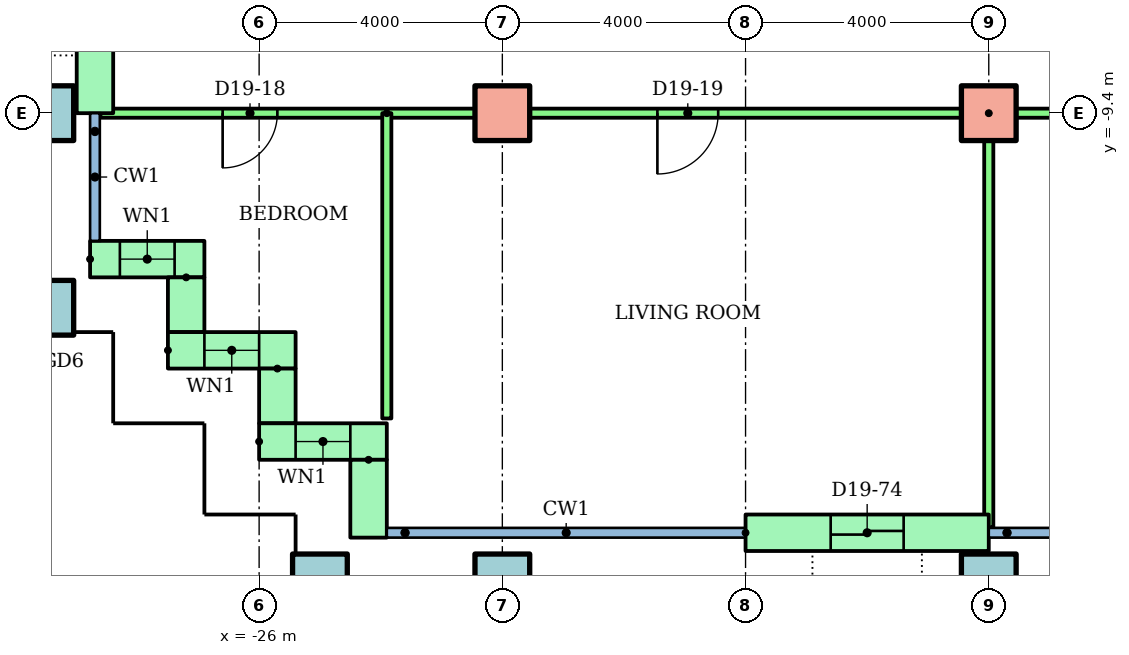
"""IFC4 building model, lengths in metres.
Left out: names, types, materials, properties, quantities, classifications, styles, units other than length and angle.
Written with IfcOpenShell. Run it as: python <this file> out.ifc"""

import sys

from ifc_helpers import new_model, si_unit, direction, frame, frame_2d, origin, origin_2d, place, context, subcontext, project, spatial, rectangle, hollow_rectangle, extrude, element, fill, save


model = new_model("IFC4")
c1 = context("Model", 3, precision=1e-05, world=origin(), true_north=direction((0.0, 1.0)))
c2 = subcontext(c1, "Body", "Model", "MODEL_VIEW")
j1 = project(units=[si_unit("LENGTHUNIT", "METRE"), si_unit("PLANEANGLEUNIT", "RADIAN")], contexts=[c1])
p1 = place(None, origin())
s1 = spatial("IfcSite", under=j1, at=p1, CompositionType="ELEMENT")
p2 = place(p1, origin())
s2 = spatial("IfcBuilding", under=s1, at=p2, CompositionType="ELEMENT")
p3 = place(p2, frame((0.0, 0.0, 77.5)))
s3 = spatial("IfcBuildingStorey", under=s2, at=p3, CompositionType="ELEMENT", Elevation=77.5)
for number, where in (
    (1, (-25.0, -17.1, 0.0)),
    (2, (-22.0, -17.1, 0.0)),
    (3, (-14.0, -17.1, 0.0)),
    (4, (-29.5, -12.6, 0.0)),
    (5, (-29.5, -9.4, 0.0)),
):
    element("IfcColumn", number, at=place(p3, frame(where)), inside=s3, PredefinedType="COLUMN", context=c2, shape_type="SweptSolid", body=[
        extrude(hollow_rectangle(XDim=0.9, YDim=0.9, WallThickness=0.045, at=origin_2d()), origin(), (0.0, 0.0, 1.0), 3.2),
    ])
for number, where in (
    (6, (-22.0, -9.4, 0.0)),
    (7, (-14.0, -9.4, 0.0)),
):
    element("IfcColumn", number, at=place(p3, frame(where)), inside=s3, PredefinedType="COLUMN", context=c2, shape_type="SweptSolid", body=[
        extrude(rectangle(XDim=0.9, YDim=0.9, at=origin_2d()), origin(), (0.0, 0.0, 1.0), 3.2),
    ])
p4 = place(p3, frame((-28.7, -5.7, 0.0), z_axis=(0.0, 0.0, 1.0), x_axis=(0.0, -1.0, 0.0)))
e8 = element("IfcWall", 8, at=p4, inside=s3, PredefinedType="STANDARD", context=c2, shape_type="SweptSolid", body=[
    extrude(rectangle(XDim=3.7, YDim=0.6, at=frame_2d((1.85, 0.0))), origin(), (0.0, 0.0, 1.0), 2.92),
])
p5 = place(p4, frame((0.825, 0.0, 0.0)))
e9 = element("IfcOpeningElement", 9, at=p5, cuts=e8, PredefinedType="OPENING", context=c2, shape_type="SweptSolid", body=[
    extrude(rectangle(XDim=1.2, YDim=2.1, at=frame_2d((0.6, 1.05))), frame((0.0, 0.31, 0.0), z_axis=(0.0, -1.0, 0.0), x_axis=(1.0, 0.0, 0.0)), (0.0, 0.0, 1.0), 0.62),
])
p6 = place(p3, frame((-28.78, -11.8, 0.0)))
e10 = element("IfcWall", 10, at=p6, inside=s3, PredefinedType="STANDARD", context=c2, shape_type="SweptSolid", body=[
    extrude(rectangle(XDim=1.88, YDim=0.6, at=frame_2d((0.94, 0.0))), origin(), (0.0, 0.0, 1.0), 2.92),
])
p7 = place(p6, frame((0.49, 0.0, 0.9)))
e11 = element("IfcOpeningElement", 11, at=p7, cuts=e10, PredefinedType="OPENING", context=c2, shape_type="SweptSolid", body=[
    extrude(rectangle(XDim=0.9, YDim=1.5, at=frame_2d((0.45, 0.75))), frame((0.0, 0.31, 0.0), z_axis=(0.0, -1.0, 0.0), x_axis=(1.0, 0.0, 0.0)), (0.0, 0.0, 1.0), 0.62),
])
p8 = place(p3, frame((-27.2, -12.1, 0.0), z_axis=(0.0, 0.0, 1.0), x_axis=(0.0, -1.0, 0.0)))
e12 = element("IfcWall", 12, at=p8, inside=s3, PredefinedType="STANDARD", context=c2, shape_type="SweptSolid", body=[
    extrude(rectangle(XDim=0.9, YDim=0.6, at=frame_2d((0.45, 0.0))), origin(), (0.0, 0.0, 1.0), 2.92),
])
p9 = place(p3, frame((-27.5, -13.3, 0.0)))
e13 = element("IfcWall", 13, at=p9, inside=s3, PredefinedType="STANDARD", context=c2, shape_type="SweptSolid", body=[
    extrude(rectangle(XDim=2.1, YDim=0.6, at=frame_2d((1.05, 0.0))), origin(), (0.0, 0.0, 1.0), 2.92),
])
p10 = place(p9, frame((0.6, 0.0, 0.9)))
e14 = element("IfcOpeningElement", 14, at=p10, cuts=e13, PredefinedType="OPENING", context=c2, shape_type="SweptSolid", body=[
    extrude(rectangle(XDim=0.9, YDim=1.5, at=frame_2d((0.45, 0.75))), frame((0.0, 0.31, 0.0), z_axis=(0.0, -1.0, 0.0), x_axis=(1.0, 0.0, 0.0)), (0.0, 0.0, 1.0), 0.62),
])
p11 = place(p3, frame((-25.7, -13.6, 0.0), z_axis=(0.0, 0.0, 1.0), x_axis=(0.0, -1.0, 0.0)))
e15 = element("IfcWall", 15, at=p11, inside=s3, PredefinedType="STANDARD", context=c2, shape_type="SweptSolid", body=[
    extrude(rectangle(XDim=0.9, YDim=0.6, at=frame_2d((0.45, 0.0))), origin(), (0.0, 0.0, 1.0), 2.92),
])
p12 = place(p3, frame((-26.0, -14.8, 0.0)))
e16 = element("IfcWall", 16, at=p12, inside=s3, PredefinedType="STANDARD", context=c2, shape_type="SweptSolid", body=[
    extrude(rectangle(XDim=2.1, YDim=0.6, at=frame_2d((1.05, 0.0))), origin(), (0.0, 0.0, 1.0), 2.92),
])
p13 = place(p12, frame((0.6, 0.0, 0.9)))
e17 = element("IfcOpeningElement", 17, at=p13, cuts=e16, PredefinedType="OPENING", context=c2, shape_type="SweptSolid", body=[
    extrude(rectangle(XDim=0.9, YDim=1.5, at=frame_2d((0.45, 0.75))), frame((0.0, 0.31, 0.0), z_axis=(0.0, -1.0, 0.0), x_axis=(1.0, 0.0, 0.0)), (0.0, 0.0, 1.0), 0.62),
])
p14 = place(p3, frame((-24.2, -15.1, 0.0), z_axis=(0.0, 0.0, 1.0), x_axis=(0.0, -1.0, 0.0)))
e18 = element("IfcWall", 18, at=p14, inside=s3, PredefinedType="STANDARD", context=c2, shape_type="SweptSolid", body=[
    extrude(rectangle(XDim=1.28, YDim=0.6, at=frame_2d((0.64, 0.0))), origin(), (0.0, 0.0, 1.0), 2.92),
])
p15 = place(p3, frame((-18.0, -16.3, 0.0)))
e19 = element("IfcWall", 19, at=p15, inside=s3, PredefinedType="STANDARD", context=c2, shape_type="SweptSolid", body=[
    extrude(rectangle(XDim=4.0, YDim=0.6, at=frame_2d((2.0, 0.0))), origin(), (0.0, 0.0, 1.0), 2.92),
])
p16 = place(p15, frame((1.4, 0.0, 0.0)))
e20 = element("IfcOpeningElement", 20, at=p16, cuts=e19, PredefinedType="OPENING", context=c2, shape_type="SweptSolid", body=[
    extrude(rectangle(XDim=1.2, YDim=2.1, at=frame_2d((0.6, 1.05))), frame((0.0, 0.31, 0.0), z_axis=(0.0, -1.0, 0.0), x_axis=(1.0, 0.0, 0.0)), (0.0, 0.0, 1.0), 0.62),
])
p17 = place(p3, frame((-6.0, -9.4, 0.0), z_axis=(0.0, 0.0, 1.0), x_axis=(-1.0, 0.0, 0.0)))
e21 = element("IfcWall", 21, at=p17, inside=s3, PredefinedType="PARTITIONING", context=c2, shape_type="SweptSolid", body=[
    extrude(rectangle(XDim=22.61, YDim=0.15, at=frame_2d((11.305, 0.0))), origin(), (0.0, 0.0, 1.0), 2.4),
])
p18 = place(p17, frame((19.7, 0.0, 0.0)))
e22 = element("IfcOpeningElement", 22, at=p18, cuts=e21, PredefinedType="OPENING", context=c2, shape_type="SweptSolid", body=[
    extrude(rectangle(XDim=0.9, YDim=2.1, at=frame_2d((0.45, 1.05))), frame((0.0, 0.085, 0.0), z_axis=(0.0, -1.0, 0.0), x_axis=(1.0, 0.0, 0.0)), (0.0, 0.0, 1.0), 0.17),
])
p19 = place(p17, frame((12.45, 0.0, 0.0)))
e23 = element("IfcOpeningElement", 23, at=p19, cuts=e21, PredefinedType="OPENING", context=c2, shape_type="SweptSolid", body=[
    extrude(rectangle(XDim=1.0, YDim=2.1, at=frame_2d((0.5, 1.05))), frame((0.0, 0.085, 0.0), z_axis=(0.0, -1.0, 0.0), x_axis=(1.0, 0.0, 0.0)), (0.0, 0.0, 1.0), 0.17),
])
p20 = place(p17, frame((5.55, 0.0, 0.0)))
e24 = element("IfcOpeningElement", 24, at=p20, cuts=e21, PredefinedType="OPENING", context=c2, shape_type="SweptSolid", body=[
    extrude(rectangle(XDim=0.9, YDim=2.1, at=frame_2d((0.45, 1.05))), frame((0.0, 0.085, 0.0), z_axis=(0.0, -1.0, 0.0), x_axis=(1.0, 0.0, 0.0)), (0.0, 0.0, 1.0), 0.17),
])
p21 = place(p17, frame((1.55, 0.0, 0.0)))
e25 = element("IfcOpeningElement", 25, at=p21, cuts=e21, PredefinedType="OPENING", context=c2, shape_type="SweptSolid", body=[
    extrude(rectangle(XDim=0.9, YDim=2.1, at=frame_2d((0.45, 1.05))), frame((0.0, 0.085, 0.0), z_axis=(0.0, -1.0, 0.0), x_axis=(1.0, 0.0, 0.0)), (0.0, 0.0, 1.0), 0.17),
])
p22 = place(p3, frame((-23.9, -9.4, 0.0), z_axis=(0.0, 0.0, 1.0), x_axis=(0.0, -1.0, 0.0)))
e26 = element("IfcWall", 26, at=p22, inside=s3, PredefinedType="PARTITIONING", context=c2, shape_type="SweptSolid", body=[
    extrude(rectangle(XDim=5.02, YDim=0.15, at=frame_2d((2.51, 0.0))), origin(), (0.0, 0.0, 1.0), 2.4),
])
p23 = place(p3, frame((-14.0, -9.4, 0.0), z_axis=(0.0, 0.0, 1.0), x_axis=(0.0, -1.0, 0.0)))
e27 = element("IfcWall", 27, at=p23, inside=s3, PredefinedType="PARTITIONING", context=c2, shape_type="SweptSolid", body=[
    extrude(rectangle(XDim=6.81, YDim=0.15, at=frame_2d((3.405, 0.0))), origin(), (0.0, 0.0, 1.0), 2.4),
])
p24 = place(p7, origin())
e28 = element("IfcWindow", 28, at=p24, inside=s3, PartitioningType="SINGLE_PANEL", PredefinedType="WINDOW", context=c2, shape_type="SweptSolid", body=[
    extrude(rectangle(XDim=0.9, YDim=1.5, at=frame_2d((0.45, 0.75))), frame((0.0, 0.03, 0.0), z_axis=(0.0, -1.0, 0.0), x_axis=(1.0, 0.0, 0.0)), (0.0, 0.0, 1.0), 0.06),
])
fill(e11, e28)
p25 = place(p10, origin())
e29 = element("IfcWindow", 29, at=p25, inside=s3, PartitioningType="SINGLE_PANEL", PredefinedType="WINDOW", context=c2, shape_type="SweptSolid", body=[
    extrude(rectangle(XDim=0.9, YDim=1.5, at=frame_2d((0.45, 0.75))), frame((0.0, 0.03, 0.0), z_axis=(0.0, -1.0, 0.0), x_axis=(1.0, 0.0, 0.0)), (0.0, 0.0, 1.0), 0.06),
])
fill(e14, e29)
p26 = place(p13, origin())
e30 = element("IfcWindow", 30, at=p26, inside=s3, PartitioningType="SINGLE_PANEL", PredefinedType="WINDOW", context=c2, shape_type="SweptSolid", body=[
    extrude(rectangle(XDim=0.9, YDim=1.5, at=frame_2d((0.45, 0.75))), frame((0.0, 0.03, 0.0), z_axis=(0.0, -1.0, 0.0), x_axis=(1.0, 0.0, 0.0)), (0.0, 0.0, 1.0), 0.06),
])
fill(e17, e30)
p27 = place(p18, origin())
e31 = element("IfcDoor", 31, at=p27, inside=s3, OperationType="SINGLE_SWING_RIGHT", PredefinedType="DOOR", context=c2, shape_type="SweptSolid", body=[
    extrude(rectangle(XDim=0.9, YDim=2.1, at=frame_2d((0.45, 1.05))), frame((0.0, 0.025, 0.0), z_axis=(0.0, -1.0, 0.0), x_axis=(1.0, 0.0, 0.0)), (0.0, 0.0, 1.0), 0.05),
])
fill(e22, e31)
p28 = place(p19, origin())
e32 = element("IfcDoor", 32, at=p28, inside=s3, OperationType="SINGLE_SWING_RIGHT", PredefinedType="DOOR", context=c2, shape_type="SweptSolid", body=[
    extrude(rectangle(XDim=1.0, YDim=2.1, at=frame_2d((0.5, 1.05))), frame((0.0, 0.025, 0.0), z_axis=(0.0, -1.0, 0.0), x_axis=(1.0, 0.0, 0.0)), (0.0, 0.0, 1.0), 0.05),
])
fill(e23, e32)
p29 = place(p16, origin())
e33 = element("IfcDoor", 33, at=p29, inside=s3, OperationType="SLIDING_TO_LEFT", PredefinedType="DOOR", context=c2, shape_type="SweptSolid", body=[
    extrude(rectangle(XDim=1.2, YDim=2.1, at=frame_2d((0.6, 1.05))), frame((0.0, 0.025, 0.0), z_axis=(0.0, -1.0, 0.0), x_axis=(1.0, 0.0, 0.0)), (0.0, 0.0, 1.0), 0.05),
])
fill(e20, e33)
save(model, sys.argv[1])
